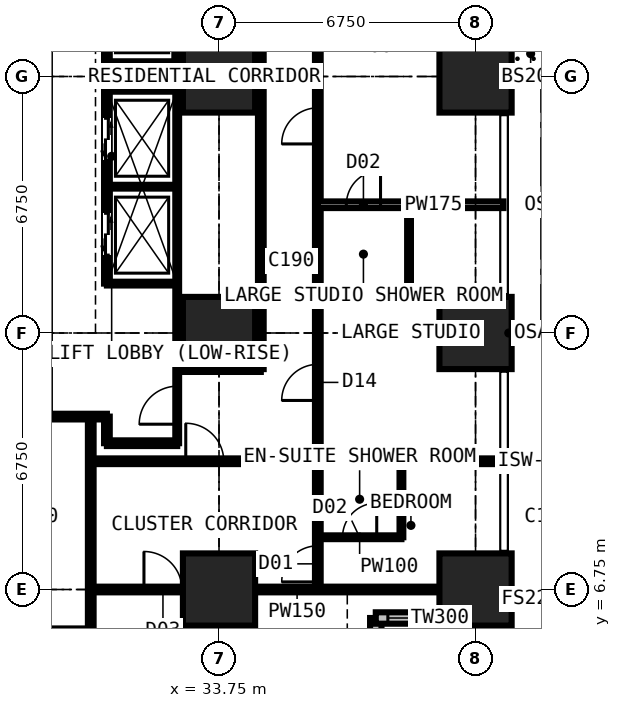
"""IFC4 building model, lengths in metres.
Left out: names, types, materials, properties, quantities, classifications, styles, units other than length and angle.
Written with IfcOpenShell. Run it as: python <this file> out.ifc"""

import sys

from ifc_helpers import new_model, si_unit, direction, frame, frame_2d, origin, origin_2d, place, context, subcontext, project, spatial, rectangle, extrude, element, fill, save


model = new_model("IFC4")
c1 = context("Model", 3, precision=1e-05, world=origin(), true_north=direction((0.0, 1.0)))
c2 = subcontext(c1, "Body", "Model", "MODEL_VIEW")
j1 = project(units=[si_unit("LENGTHUNIT", "METRE"), si_unit("PLANEANGLEUNIT", "RADIAN")], contexts=[c1])
p1 = place(None, origin())
s1 = spatial("IfcSite", under=j1, at=p1, CompositionType="ELEMENT")
p2 = place(p1, origin())
s2 = spatial("IfcBuilding", under=s1, at=p2, CompositionType="ELEMENT")
p3 = place(p2, frame((0.0, 0.0, 21.6)))
s3 = spatial("IfcBuildingStorey", under=s2, at=p3, CompositionType="ELEMENT", Elevation=21.6)
for number, where, z_axis, x_axis in (
    (1, (33.75, 6.75, 0.0), (0.0, 0.0, 1.0), (1.0, 0.0, 0.0)),
    (2, (33.75, 13.5, 0.0), (0.0, 0.0, 1.0), (1.0, 0.0, 0.0)),
    (3, (33.75, 20.25, 0.0), (0.0, 0.0, 1.0), (1.0, 0.0, 0.0)),
    (4, (40.5, 6.75, 0.0), (0.0, 0.0, 1.0), (1.0, 0.0, 0.0)),
    (5, (40.5, 13.5, 0.0), (0.0, 0.0, 1.0), (1.0, 0.0, 0.0)),
    (6, (40.5, 20.25, 0.0), (0.0, 0.0, 1.0), (1.0, 0.0, 0.0)),
):
    element("IfcColumn", number, at=place(p3, frame(where, z_axis=z_axis, x_axis=x_axis)), inside=s3, PredefinedType="COLUMN", context=c2, shape_type="SweptSolid", body=[
        extrude(rectangle(XDim=1.9, YDim=1.9, at=origin_2d()), origin(), (0.0, 0.0, 1.0), 3.6),
    ])
p4 = place(p3, frame((41.25, 27.0, 0.0), z_axis=(0.0, 0.0, 1.0), x_axis=(0.0, -1.0, 0.0)))
e7 = element("IfcWall", 7, at=p4, inside=s3, PredefinedType="SOLIDWALL", context=c2, shape_type="SweptSolid", body=[
    extrude(rectangle(XDim=6.75, YDim=0.15, at=frame_2d((3.375, 0.0))), origin(), (0.0, 0.0, 1.0), 3.375),
])
p5 = place(p4, frame((0.996, 0.0, 0.0)))
e8 = element("IfcOpeningElement", 8, at=p5, cuts=e7, PredefinedType="OPENING", context=c2, shape_type="SweptSolid", body=[
    extrude(rectangle(XDim=1.0, YDim=2.2, at=frame_2d((0.5, 1.1))), frame((0.0, 0.085, 0.0), z_axis=(0.0, -1.0, 0.0), x_axis=(1.0, 0.0, 0.0)), (0.0, 0.0, 1.0), 0.17),
])
p6 = place(p4, frame((2.042, 0.0, 0.9)))
e9 = element("IfcOpeningElement", 9, at=p6, cuts=e7, PredefinedType="OPENING", context=c2, shape_type="SweptSolid", body=[
    extrude(rectangle(XDim=1.2, YDim=1.8, at=frame_2d((0.6, 0.9))), frame((0.0, 0.085, 0.0), z_axis=(0.0, -1.0, 0.0), x_axis=(1.0, 0.0, 0.0)), (0.0, 0.0, 1.0), 0.17),
])
p7 = place(p4, frame((4.754, 0.0, 0.0)))
e10 = element("IfcOpeningElement", 10, at=p7, cuts=e7, PredefinedType="OPENING", context=c2, shape_type="SweptSolid", body=[
    extrude(rectangle(XDim=1.0, YDim=2.2, at=frame_2d((0.5, 1.1))), frame((0.0, 0.085, 0.0), z_axis=(0.0, -1.0, 0.0), x_axis=(1.0, 0.0, 0.0)), (0.0, 0.0, 1.0), 0.17),
])
p8 = place(p4, frame((3.508, 0.0, 0.9)))
e11 = element("IfcOpeningElement", 11, at=p8, cuts=e7, PredefinedType="OPENING", context=c2, shape_type="SweptSolid", body=[
    extrude(rectangle(XDim=1.2, YDim=1.8, at=frame_2d((0.6, 0.9))), frame((0.0, 0.085, 0.0), z_axis=(0.0, -1.0, 0.0), x_axis=(1.0, 0.0, 0.0)), (0.0, 0.0, 1.0), 0.17),
])
p9 = place(p3, frame((37.875, 2.625, 0.0), z_axis=(0.0, 0.0, 1.0), x_axis=(0.0, 1.0, 0.0)))
e12 = element("IfcWall", 12, at=p9, inside=s3, PredefinedType="SOLIDWALL", context=c2, shape_type="SweptSolid", body=[
    extrude(rectangle(XDim=3.375, YDim=0.3, at=frame_2d((1.688, 0.0))), origin(), (0.0, 0.0, 1.0), 3.375),
])
p10 = place(p9, frame((0.788, 0.0, 0.6)))
e13 = element("IfcOpeningElement", 13, at=p10, cuts=e12, PredefinedType="OPENING", context=c2, shape_type="SweptSolid", body=[
    extrude(rectangle(XDim=1.8, YDim=2.1, at=frame_2d((0.9, 1.05))), frame((0.0, 0.16, 0.0), z_axis=(0.0, -1.0, 0.0), x_axis=(1.0, 0.0, 0.0)), (0.0, 0.0, 1.0), 0.32),
])
p11 = place(p3, frame((37.875, 6.0, 0.0), z_axis=(0.0, 0.0, 1.0), x_axis=(1.0, 0.0, 0.0)))
e14 = element("IfcWall", 14, at=p11, inside=s3, PredefinedType="SOLIDWALL", context=c2, shape_type="SweptSolid", body=[
    extrude(rectangle(XDim=3.375, YDim=0.3, at=frame_2d((1.688, 0.0))), origin(), (0.0, 0.0, 1.0), 3.375),
])
p12 = place(p11, frame((0.317, 0.0, 0.9)))
e15 = element("IfcOpeningElement", 15, at=p12, cuts=e14, PredefinedType="OPENING", context=c2, shape_type="SweptSolid", body=[
    extrude(rectangle(XDim=1.2, YDim=1.8, at=frame_2d((0.6, 0.9))), frame((0.0, 0.16, 0.0), z_axis=(0.0, -1.0, 0.0), x_axis=(1.0, 0.0, 0.0)), (0.0, 0.0, 1.0), 0.32),
])
p13 = place(p3, frame((10.125, 11.3, 0.0), z_axis=(0.0, 0.0, 1.0), x_axis=(1.0, 0.0, 0.0)))
e16 = element("IfcWall", 16, at=p13, inside=s3, PredefinedType="PARTITIONING", context=c2, shape_type="SweptSolid", body=[
    extrude(rectangle(XDim=20.675, YDim=0.15, at=frame_2d((10.337, 0.0))), origin(), (0.0, 0.0, 1.0), 3.375),
])
p14 = place(p13, frame((8.375, 0.0, 0.0)))
e17 = element("IfcOpeningElement", 17, at=p14, cuts=e16, PredefinedType="OPENING", context=c2, shape_type="SweptSolid", body=[
    extrude(rectangle(XDim=1.0, YDim=2.2, at=frame_2d((0.5, 1.1))), frame((0.0, 0.085, 0.0), z_axis=(0.0, -1.0, 0.0), x_axis=(1.0, 0.0, 0.0)), (0.0, 0.0, 1.0), 0.17),
])
p15 = place(p13, frame((10.975, 0.0, 0.0)))
e18 = element("IfcOpeningElement", 18, at=p15, cuts=e16, PredefinedType="OPENING", context=c2, shape_type="SweptSolid", body=[
    extrude(rectangle(XDim=1.0, YDim=2.2, at=frame_2d((0.5, 1.1))), frame((0.0, 0.085, 0.0), z_axis=(0.0, -1.0, 0.0), x_axis=(1.0, 0.0, 0.0)), (0.0, 0.0, 1.0), 0.17),
])
p16 = place(p13, frame((3.925, 0.0, 0.0)))
e19 = element("IfcOpeningElement", 19, at=p16, cuts=e16, PredefinedType="OPENING", context=c2, shape_type="SweptSolid", body=[
    extrude(rectangle(XDim=0.95, YDim=2.2, at=frame_2d((0.475, 1.1))), frame((0.0, 0.085, 0.0), z_axis=(0.0, -1.0, 0.0), x_axis=(1.0, 0.0, 0.0)), (0.0, 0.0, 1.0), 0.17),
])
p17 = place(p3, frame((30.375, -0.734, 0.0), z_axis=(0.0, 0.0, 1.0), x_axis=(0.0, 1.0, 0.0)))
e20 = element("IfcWall", 20, at=p17, inside=s3, PredefinedType="PARTITIONING", context=c2, shape_type="SweptSolid", body=[
    extrude(rectangle(XDim=12.034, YDim=0.15, at=frame_2d((6.017, 0.0))), origin(), (0.0, 0.0, 1.0), 3.375),
])
p18 = place(p3, frame((30.375, 6.75, 0.0), z_axis=(0.0, 0.0, 1.0), x_axis=(1.0, 0.0, 0.0)))
e21 = element("IfcWall", 21, at=p18, inside=s3, PredefinedType="PARTITIONING", context=c2, shape_type="SweptSolid", body=[
    extrude(rectangle(XDim=10.859, YDim=0.15, at=frame_2d((5.429, 0.0))), origin(), (0.0, 0.0, 1.0), 2.877),
])
p19 = place(p18, frame((1.4, 0.0, 0.0)))
e22 = element("IfcOpeningElement", 22, at=p19, cuts=e21, PredefinedType="OPENING", context=c2, shape_type="SweptSolid", body=[
    extrude(rectangle(XDim=1.0, YDim=2.2, at=frame_2d((0.5, 1.1))), frame((0.0, 0.085, 0.0), z_axis=(0.0, -1.0, 0.0), x_axis=(1.0, 0.0, 0.0)), (0.0, 0.0, 1.0), 0.17),
])
p20 = place(p3, frame((30.375, 10.125, 0.0), z_axis=(0.0, 0.0, 1.0), x_axis=(1.0, 0.0, 0.0)))
e23 = element("IfcWall", 23, at=p20, inside=s3, PredefinedType="PARTITIONING", context=c2, shape_type="SweptSolid", body=[
    extrude(rectangle(XDim=10.859, YDim=0.15, at=frame_2d((5.429, 0.0))), origin(), (0.0, 0.0, 1.0), 3.375),
])
p21 = place(p20, frame((2.5, 0.0, 0.0)))
e24 = element("IfcOpeningElement", 24, at=p21, cuts=e23, PredefinedType="OPENING", context=c2, shape_type="SweptSolid", body=[
    extrude(rectangle(XDim=1.0, YDim=2.2, at=frame_2d((0.5, 1.1))), frame((0.0, 0.085, 0.0), z_axis=(0.0, -1.0, 0.0), x_axis=(1.0, 0.0, 0.0)), (0.0, 0.0, 1.0), 0.17),
])
p22 = place(p3, frame((30.8, 10.6, 0.0), z_axis=(0.0, 0.0, 1.0), x_axis=(0.0, 1.0, 0.0)))
e25 = element("IfcWall", 25, at=p22, inside=s3, PredefinedType="PARTITIONING", context=c2, shape_type="SweptSolid", body=[
    extrude(rectangle(XDim=0.7, YDim=0.15, at=frame_2d((0.35, 0.0))), origin(), (0.0, 0.0, 1.0), 3.375),
])
p23 = place(p3, frame((30.8, 10.6, 0.0), z_axis=(0.0, 0.0, 1.0), x_axis=(1.0, 0.0, 0.0)))
e26 = element("IfcWall", 26, at=p23, inside=s3, PredefinedType="PARTITIONING", context=c2, shape_type="SweptSolid", body=[
    extrude(rectangle(XDim=1.85, YDim=0.15, at=frame_2d((0.925, 0.0))), origin(), (0.0, 0.0, 1.0), 3.375),
])
p24 = place(p3, frame((30.8, 14.8, 0.0), z_axis=(0.0, 0.0, 1.0), x_axis=(0.0, 1.0, 0.0)))
e27 = element("IfcWall", 27, at=p24, inside=s3, PredefinedType="PARTITIONING", context=c2, shape_type="SweptSolid", body=[
    extrude(rectangle(XDim=10.9, YDim=0.15, at=frame_2d((5.45, 0.0))), origin(), (0.0, 0.0, 1.0), 3.375),
])
p25 = place(p24, frame((0.75, 0.0, 0.0)))
e28 = element("IfcOpeningElement", 28, at=p25, cuts=e27, PredefinedType="OPENING", context=c2, shape_type="SweptSolid", body=[
    extrude(rectangle(XDim=1.1, YDim=2.2, at=frame_2d((0.55, 1.1))), frame((0.0, 0.085, 0.0), z_axis=(0.0, -1.0, 0.0), x_axis=(1.0, 0.0, 0.0)), (0.0, 0.0, 1.0), 0.17),
])
p26 = place(p24, frame((3.25, 0.0, 0.0)))
e29 = element("IfcOpeningElement", 29, at=p26, cuts=e27, PredefinedType="OPENING", context=c2, shape_type="SweptSolid", body=[
    extrude(rectangle(XDim=1.1, YDim=2.2, at=frame_2d((0.55, 1.1))), frame((0.0, 0.085, 0.0), z_axis=(0.0, -1.0, 0.0), x_axis=(1.0, 0.0, 0.0)), (0.0, 0.0, 1.0), 0.17),
])
p27 = place(p24, frame((6.5, 0.0, 0.0)))
e30 = element("IfcOpeningElement", 30, at=p27, cuts=e27, PredefinedType="OPENING", context=c2, shape_type="SweptSolid", body=[
    extrude(rectangle(XDim=1.1, YDim=2.2, at=frame_2d((0.55, 1.1))), frame((0.0, 0.085, 0.0), z_axis=(0.0, -1.0, 0.0), x_axis=(1.0, 0.0, 0.0)), (0.0, 0.0, 1.0), 0.17),
])
p28 = place(p24, frame((9.05, 0.0, 0.0)))
e31 = element("IfcOpeningElement", 31, at=p28, cuts=e27, PredefinedType="OPENING", context=c2, shape_type="SweptSolid", body=[
    extrude(rectangle(XDim=1.1, YDim=2.2, at=frame_2d((0.55, 1.1))), frame((0.0, 0.085, 0.0), z_axis=(0.0, -1.0, 0.0), x_axis=(1.0, 0.0, 0.0)), (0.0, 0.0, 1.0), 0.17),
])
for number, where, z_axis, x_axis in (
    (32, (30.8, 14.8, 0.0), (0.0, 0.0, 1.0), (1.0, 0.0, 0.0)),
    (33, (30.8, 17.35, 0.0), (0.0, 0.0, 1.0), (1.0, 0.0, 0.0)),
    (34, (30.8, 19.9, 0.0), (0.0, 0.0, 1.0), (1.0, 0.0, 0.0)),
    (35, (30.8, 20.6, 0.0), (0.0, 0.0, 1.0), (1.0, 0.0, 0.0)),
):
    element("IfcWall", number, at=place(p3, frame(where, z_axis=z_axis, x_axis=x_axis)), inside=s3, PredefinedType="SHEAR", context=c2, shape_type="SweptSolid", body=[
        extrude(rectangle(XDim=1.85, YDim=0.1, at=frame_2d((0.925, 0.0))), origin(), (0.0, 0.0, 1.0), 3.375),
    ])
p29 = place(p3, frame((32.65, 10.6, 0.0), z_axis=(0.0, 0.0, 1.0), x_axis=(0.0, 1.0, 0.0)))
e36 = element("IfcWall", 36, at=p29, inside=s3, PredefinedType="SHEAR", context=c2, shape_type="SweptSolid", body=[
    extrude(rectangle(XDim=9.3, YDim=0.1, at=frame_2d((4.65, 0.0))), origin(), (0.0, 0.0, 1.0), 3.375),
])
p30 = place(p29, frame((0.5, 0.0, 0.0)))
e37 = element("IfcOpeningElement", 37, at=p30, cuts=e36, PredefinedType="OPENING", context=c2, shape_type="SweptSolid", body=[
    extrude(rectangle(XDim=1.0, YDim=2.2, at=frame_2d((0.5, 1.1))), frame((0.0, 0.06, 0.0), z_axis=(0.0, -1.0, 0.0), x_axis=(1.0, 0.0, 0.0)), (0.0, 0.0, 1.0), 0.12),
])
p31 = place(p3, frame((32.65, 12.55, 0.0), z_axis=(0.0, 0.0, 1.0), x_axis=(1.0, 0.0, 0.0)))
e38 = element("IfcWall", 38, at=p31, inside=s3, PredefinedType="PARTITIONING", context=c2, shape_type="SweptSolid", body=[
    extrude(rectangle(XDim=2.2, YDim=0.15, at=frame_2d((1.1, 0.0))), origin(), (0.0, 0.0, 1.0), 3.375),
])
p32 = place(p3, frame((32.65, 20.6, 0.0), z_axis=(0.0, 0.0, 1.0), x_axis=(0.0, 1.0, 0.0)))
e39 = element("IfcWall", 39, at=p32, inside=s3, PredefinedType="PARTITIONING", context=c2, shape_type="SweptSolid", body=[
    extrude(rectangle(XDim=5.1, YDim=0.15, at=frame_2d((2.55, 0.0))), origin(), (0.0, 0.0, 1.0), 3.375),
])
p33 = place(p3, frame((34.85, 12.55, 0.0), z_axis=(0.0, 0.0, 1.0), x_axis=(0.0, 1.0, 0.0)))
e40 = element("IfcWall", 40, at=p33, inside=s3, PredefinedType="PARTITIONING", context=c2, shape_type="SweptSolid", body=[
    extrude(rectangle(XDim=17.825, YDim=0.15, at=frame_2d((8.913, 0.0))), origin(), (0.0, 0.0, 1.0), 3.375),
])
p34 = place(p33, frame((8.65, 0.0, 0.0)))
e41 = element("IfcOpeningElement", 41, at=p34, cuts=e40, PredefinedType="OPENING", context=c2, shape_type="SweptSolid", body=[
    extrude(rectangle(XDim=0.95, YDim=2.2, at=frame_2d((0.475, 1.1))), frame((0.0, 0.085, 0.0), z_axis=(0.0, -1.0, 0.0), x_axis=(1.0, 0.0, 0.0)), (0.0, 0.0, 1.0), 0.17),
])
p35 = place(p3, frame((36.35, 6.75, 0.0), z_axis=(0.0, 0.0, 1.0), x_axis=(0.0, 1.0, 0.0)))
e42 = element("IfcWall", 42, at=p35, inside=s3, PredefinedType="PARTITIONING", context=c2, shape_type="SweptSolid", body=[
    extrude(rectangle(XDim=23.625, YDim=0.15, at=frame_2d((11.812, 0.0))), origin(), (0.0, 0.0, 1.0), 3.375),
])
p36 = place(p35, frame((0.2, 0.0, 0.0)))
e43 = element("IfcOpeningElement", 43, at=p36, cuts=e42, PredefinedType="OPENING", context=c2, shape_type="SweptSolid", body=[
    extrude(rectangle(XDim=0.95, YDim=2.2, at=frame_2d((0.475, 1.1))), frame((0.0, 0.085, 0.0), z_axis=(0.0, -1.0, 0.0), x_axis=(1.0, 0.0, 0.0)), (0.0, 0.0, 1.0), 0.17),
])
p37 = place(p35, frame((18.475, 0.0, 0.0)))
e44 = element("IfcOpeningElement", 44, at=p37, cuts=e42, PredefinedType="OPENING", context=c2, shape_type="SweptSolid", body=[
    extrude(rectangle(XDim=0.95, YDim=2.2, at=frame_2d((0.475, 1.1))), frame((0.0, 0.085, 0.0), z_axis=(0.0, -1.0, 0.0), x_axis=(1.0, 0.0, 0.0)), (0.0, 0.0, 1.0), 0.17),
])
p38 = place(p35, frame((11.725, 0.0, 0.0)))
e45 = element("IfcOpeningElement", 45, at=p38, cuts=e42, PredefinedType="OPENING", context=c2, shape_type="SweptSolid", body=[
    extrude(rectangle(XDim=0.95, YDim=2.2, at=frame_2d((0.475, 1.1))), frame((0.0, 0.085, 0.0), z_axis=(0.0, -1.0, 0.0), x_axis=(1.0, 0.0, 0.0)), (0.0, 0.0, 1.0), 0.17),
])
p39 = place(p35, frame((4.975, 0.0, 0.0)))
e46 = element("IfcOpeningElement", 46, at=p39, cuts=e42, PredefinedType="OPENING", context=c2, shape_type="SweptSolid", body=[
    extrude(rectangle(XDim=0.95, YDim=2.2, at=frame_2d((0.475, 1.1))), frame((0.0, 0.085, 0.0), z_axis=(0.0, -1.0, 0.0), x_axis=(1.0, 0.0, 0.0)), (0.0, 0.0, 1.0), 0.17),
])
p40 = place(p3, frame((36.35, 8.125, 0.0), z_axis=(0.0, 0.0, 1.0), x_axis=(1.0, 0.0, 0.0)))
e47 = element("IfcWall", 47, at=p40, inside=s3, PredefinedType="PARTITIONING", context=c2, shape_type="SweptSolid", body=[
    extrude(rectangle(XDim=2.2, YDim=0.1, at=frame_2d((1.1, 0.0))), origin(), (0.0, 0.0, 1.0), 3.375),
])
p41 = place(p40, frame((0.65, 0.0, 0.0)))
e48 = element("IfcOpeningElement", 48, at=p41, cuts=e47, PredefinedType="OPENING", context=c2, shape_type="SweptSolid", body=[
    extrude(rectangle(XDim=0.9, YDim=2.2, at=frame_2d((0.45, 1.1))), frame((0.0, 0.06, 0.0), z_axis=(0.0, -1.0, 0.0), x_axis=(1.0, 0.0, 0.0)), (0.0, 0.0, 1.0), 0.12),
])
p42 = place(p3, frame((36.35, 14.275, 0.0), z_axis=(0.0, 0.0, 1.0), x_axis=(1.0, 0.0, 0.0)))
e49 = element("IfcWall", 49, at=p42, inside=s3, PredefinedType="PARTITIONING", context=c2, shape_type="SweptSolid", body=[
    extrude(rectangle(XDim=2.4, YDim=0.1, at=frame_2d((1.2, 0.0))), origin(), (0.0, 0.0, 1.0), 3.375),
])
p43 = place(p3, frame((36.35, 16.875, 0.0), z_axis=(0.0, 0.0, 1.0), x_axis=(1.0, 0.0, 0.0)))
e50 = element("IfcWall", 50, at=p43, inside=s3, PredefinedType="PARTITIONING", context=c2, shape_type="SweptSolid", body=[
    extrude(rectangle(XDim=4.884, YDim=0.175, at=frame_2d((2.442, 0.0))), origin(), (0.0, 0.0, 1.0), 3.375),
])
p44 = place(p43, frame((0.75, 0.0, 0.0)))
e51 = element("IfcOpeningElement", 51, at=p44, cuts=e50, PredefinedType="OPENING", context=c2, shape_type="SweptSolid", body=[
    extrude(rectangle(XDim=0.9, YDim=2.2, at=frame_2d((0.45, 1.1))), frame((0.0, 0.097, 0.0), z_axis=(0.0, -1.0, 0.0), x_axis=(1.0, 0.0, 0.0)), (0.0, 0.0, 1.0), 0.195),
])
p45 = place(p3, frame((38.55, 8.125, 0.0), z_axis=(0.0, 0.0, 1.0), x_axis=(0.0, 1.0, 0.0)))
e52 = element("IfcWall", 52, at=p45, inside=s3, PredefinedType="PARTITIONING", context=c2, shape_type="SweptSolid", body=[
    extrude(rectangle(XDim=2.0, YDim=0.1, at=frame_2d((1.0, 0.0))), origin(), (0.0, 0.0, 1.0), 3.375),
])
p46 = place(p3, frame((38.75, 14.275, 0.0), z_axis=(0.0, 0.0, 1.0), x_axis=(0.0, 1.0, 0.0)))
e53 = element("IfcWall", 53, at=p46, inside=s3, PredefinedType="PARTITIONING", context=c2, shape_type="SweptSolid", body=[
    extrude(rectangle(XDim=2.6, YDim=0.1, at=frame_2d((1.3, 0.0))), origin(), (0.0, 0.0, 1.0), 3.375),
])
p47 = place(p12, origin())
e54 = element("IfcWindow", 54, at=p47, inside=s3, PartitioningType="SINGLE_PANEL", PredefinedType="WINDOW", context=c2, shape_type="SweptSolid", body=[
    extrude(rectangle(XDim=1.2, YDim=1.8, at=frame_2d((0.6, 0.9))), frame((0.0, 0.03, 0.0), z_axis=(0.0, -1.0, 0.0), x_axis=(1.0, 0.0, 0.0)), (0.0, 0.0, 1.0), 0.06),
])
fill(e15, e54)
p48 = place(p19, origin())
e55 = element("IfcDoor", 55, at=p48, inside=s3, OperationType="SINGLE_SWING_LEFT", PredefinedType="DOOR", context=c2, shape_type="SweptSolid", body=[
    extrude(rectangle(XDim=1.0, YDim=2.2, at=frame_2d((0.5, 1.1))), frame((0.0, 0.025, 0.0), z_axis=(0.0, -1.0, 0.0), x_axis=(1.0, 0.0, 0.0)), (0.0, 0.0, 1.0), 0.05),
])
fill(e22, e55)
p49 = place(p36, origin())
e56 = element("IfcDoor", 56, at=p49, inside=s3, OperationType="SINGLE_SWING_LEFT", PredefinedType="DOOR", context=c2, shape_type="SweptSolid", body=[
    extrude(rectangle(XDim=0.95, YDim=2.2, at=frame_2d((0.475, 1.1))), frame((0.0, 0.025, 0.0), z_axis=(0.0, -1.0, 0.0), x_axis=(1.0, 0.0, 0.0)), (0.0, 0.0, 1.0), 0.05),
])
fill(e43, e56)
p50 = place(p41, origin())
e57 = element("IfcDoor", 57, at=p50, inside=s3, OperationType="SINGLE_SWING_RIGHT", PredefinedType="DOOR", context=c2, shape_type="SweptSolid", body=[
    extrude(rectangle(XDim=0.9, YDim=2.2, at=frame_2d((0.45, 1.1))), frame((0.0, 0.025, 0.0), z_axis=(0.0, -1.0, 0.0), x_axis=(1.0, 0.0, 0.0)), (0.0, 0.0, 1.0), 0.05),
])
fill(e48, e57)
p51 = place(p21, origin())
e58 = element("IfcDoor", 58, at=p51, inside=s3, OperationType="SINGLE_SWING_LEFT", PredefinedType="DOOR", context=c2, shape_type="SweptSolid", body=[
    extrude(rectangle(XDim=1.0, YDim=2.2, at=frame_2d((0.5, 1.1))), frame((0.0, 0.025, 0.0), z_axis=(0.0, -1.0, 0.0), x_axis=(1.0, 0.0, 0.0)), (0.0, 0.0, 1.0), 0.05),
])
fill(e24, e58)
p52 = place(p38, origin())
e59 = element("IfcDoor", 59, at=p52, inside=s3, OperationType="SINGLE_SWING_LEFT", PredefinedType="DOOR", context=c2, shape_type="SweptSolid", body=[
    extrude(rectangle(XDim=0.95, YDim=2.2, at=frame_2d((0.475, 1.1))), frame((0.0, 0.025, 0.0), z_axis=(0.0, -1.0, 0.0), x_axis=(1.0, 0.0, 0.0)), (0.0, 0.0, 1.0), 0.05),
])
fill(e45, e59)
p53 = place(p39, origin())
e60 = element("IfcDoor", 60, at=p53, inside=s3, OperationType="SINGLE_SWING_LEFT", PredefinedType="DOOR", context=c2, shape_type="SweptSolid", body=[
    extrude(rectangle(XDim=0.95, YDim=2.2, at=frame_2d((0.475, 1.1))), frame((0.0, 0.025, 0.0), z_axis=(0.0, -1.0, 0.0), x_axis=(1.0, 0.0, 0.0)), (0.0, 0.0, 1.0), 0.05),
])
fill(e46, e60)
p54 = place(p44, origin())
e61 = element("IfcDoor", 61, at=p54, inside=s3, OperationType="SINGLE_SWING_RIGHT", PredefinedType="DOOR", context=c2, shape_type="SweptSolid", body=[
    extrude(rectangle(XDim=0.9, YDim=2.2, at=frame_2d((0.45, 1.1))), frame((0.0, 0.025, 0.0), z_axis=(0.0, -1.0, 0.0), x_axis=(1.0, 0.0, 0.0)), (0.0, 0.0, 1.0), 0.05),
])
fill(e51, e61)
p55 = place(p30, origin())
e62 = element("IfcDoor", 62, at=p55, inside=s3, OperationType="SINGLE_SWING_LEFT", PredefinedType="DOOR", context=c2, shape_type="SweptSolid", body=[
    extrude(rectangle(XDim=1.0, YDim=2.2, at=frame_2d((0.5, 1.1))), frame((0.0, 0.025, 0.0), z_axis=(0.0, -1.0, 0.0), x_axis=(1.0, 0.0, 0.0)), (0.0, 0.0, 1.0), 0.05),
])
fill(e37, e62)
p56 = place(p25, origin())
e63 = element("IfcDoor", 63, at=p56, inside=s3, OperationType="DOUBLE_DOOR_SLIDING", PredefinedType="DOOR", context=c2, shape_type="SweptSolid", body=[
    extrude(rectangle(XDim=1.1, YDim=2.2, at=frame_2d((0.55, 1.1))), frame((0.0, 0.025, 0.0), z_axis=(0.0, -1.0, 0.0), x_axis=(1.0, 0.0, 0.0)), (0.0, 0.0, 1.0), 0.05),
])
fill(e28, e63)
p57 = place(p26, origin())
e64 = element("IfcDoor", 64, at=p57, inside=s3, OperationType="DOUBLE_DOOR_SLIDING", PredefinedType="DOOR", context=c2, shape_type="SweptSolid", body=[
    extrude(rectangle(XDim=1.1, YDim=2.2, at=frame_2d((0.55, 1.1))), frame((0.0, 0.025, 0.0), z_axis=(0.0, -1.0, 0.0), x_axis=(1.0, 0.0, 0.0)), (0.0, 0.0, 1.0), 0.05),
])
fill(e29, e64)
save(model, sys.argv[1])
